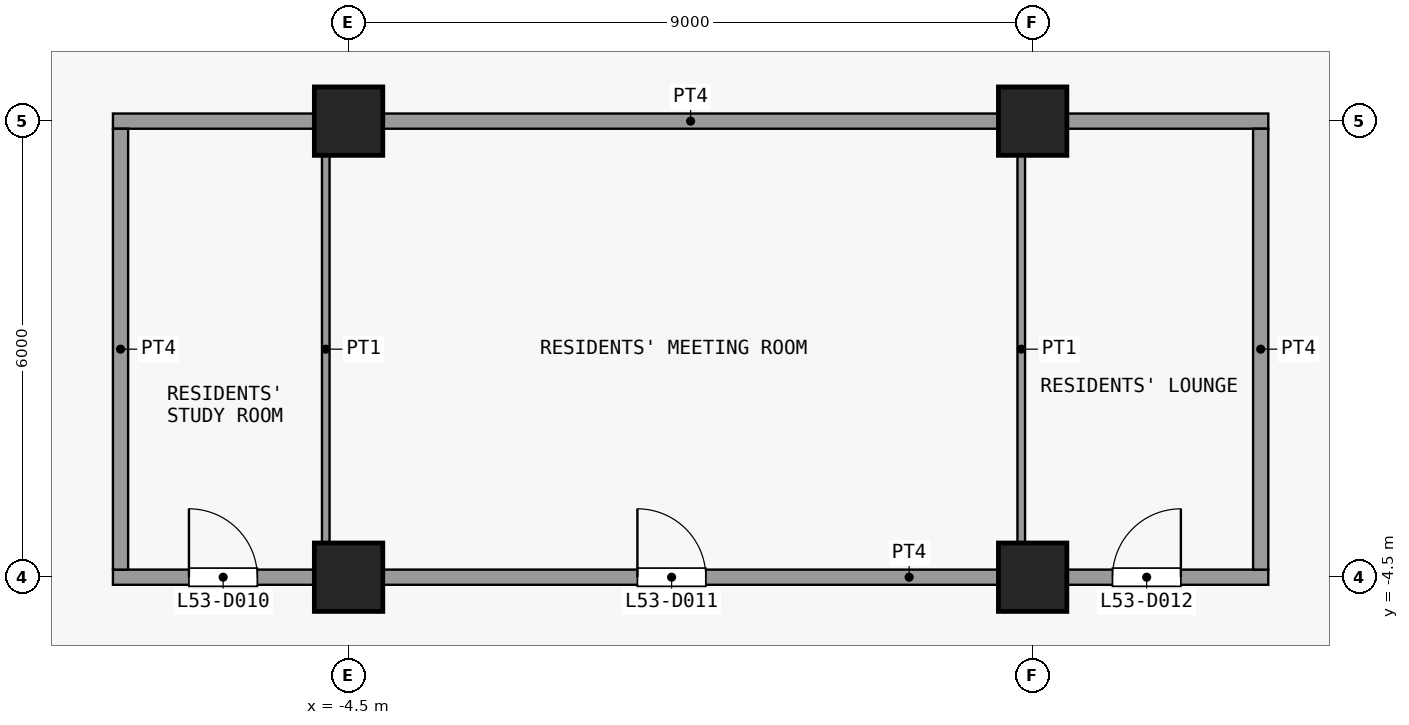
"""IFC4 building model, lengths in metres.
Left out: names, types, materials, properties, quantities, classifications, styles, units other than length and angle.
Written with IfcOpenShell. Run it as: python <this file> out.ifc"""

import sys

from ifc_helpers import new_model, si_unit, direction, frame, frame_2d, origin, origin_2d, place, context, subcontext, project, spatial, rectangle, extrude, element, fill, save


model = new_model("IFC4")
c1 = context("Model", 3, precision=1e-05, world=origin(), true_north=direction((0.0, 1.0)))
c2 = subcontext(c1, "Body", "Model", "MODEL_VIEW")
j1 = project(units=[si_unit("LENGTHUNIT", "METRE"), si_unit("PLANEANGLEUNIT", "RADIAN")], contexts=[c1])
p1 = place(None, origin())
s1 = spatial("IfcSite", under=j1, at=p1, CompositionType="ELEMENT")
p2 = place(p1, origin())
s2 = spatial("IfcBuilding", under=s1, at=p2, CompositionType="ELEMENT")
p3 = place(p2, frame((0.0, 0.0, 212.3)))
s3 = spatial("IfcBuildingStorey", under=s2, at=p3, CompositionType="ELEMENT", Elevation=212.3)
for number, where, z_axis, x_axis in (
    (1, (-4.5, -4.5, 0.0), (0.0, 0.0, 1.0), (1.0, 0.0, 0.0)),
    (2, (-4.5, 1.5, 0.0), (0.0, 0.0, 1.0), (1.0, 0.0, 0.0)),
    (3, (4.5, -4.5, 0.0), (0.0, 0.0, 1.0), (1.0, 0.0, 0.0)),
    (4, (4.5, 1.5, 0.0), (0.0, 0.0, 1.0), (1.0, 0.0, 0.0)),
):
    element("IfcColumn", number, at=place(p3, frame(where, z_axis=z_axis, x_axis=x_axis)), inside=s3, PredefinedType="COLUMN", context=c2, shape_type="SweptSolid", body=[
        extrude(rectangle(XDim=0.9, YDim=0.9, at=origin_2d()), origin(), (0.0, 0.0, 1.0), 3.6),
    ])
p4 = place(p3, frame((-7.6, -4.5, 0.0), z_axis=(0.0, 0.0, 1.0), x_axis=(1.0, 0.0, 0.0)))
e5 = element("IfcWall", 5, at=p4, inside=s3, PredefinedType="PARTITIONING", context=c2, shape_type="SweptSolid", body=[
    extrude(rectangle(XDim=15.2, YDim=0.2, at=frame_2d((7.6, 0.0))), origin(), (0.0, 0.0, 1.0), 3.3),
])
p5 = place(p4, frame((1.0, 0.0, 0.0)))
e6 = element("IfcOpeningElement", 6, at=p5, cuts=e5, PredefinedType="OPENING", context=c2, shape_type="SweptSolid", body=[
    extrude(rectangle(XDim=0.9, YDim=2.1, at=frame_2d((0.45, 1.05))), frame((0.0, 0.11, 0.0), z_axis=(0.0, -1.0, 0.0), x_axis=(1.0, 0.0, 0.0)), (0.0, 0.0, 1.0), 0.22),
])
p6 = place(p4, frame((6.9, 0.0, 0.0)))
e7 = element("IfcOpeningElement", 7, at=p6, cuts=e5, PredefinedType="OPENING", context=c2, shape_type="SweptSolid", body=[
    extrude(rectangle(XDim=0.9, YDim=2.1, at=frame_2d((0.45, 1.05))), frame((0.0, 0.11, 0.0), z_axis=(0.0, -1.0, 0.0), x_axis=(1.0, 0.0, 0.0)), (0.0, 0.0, 1.0), 0.22),
])
p7 = place(p4, frame((13.15, 0.0, 0.0)))
e8 = element("IfcOpeningElement", 8, at=p7, cuts=e5, PredefinedType="OPENING", context=c2, shape_type="SweptSolid", body=[
    extrude(rectangle(XDim=0.9, YDim=2.1, at=frame_2d((0.45, 1.05))), frame((0.0, 0.11, 0.0), z_axis=(0.0, -1.0, 0.0), x_axis=(1.0, 0.0, 0.0)), (0.0, 0.0, 1.0), 0.22),
])
p8 = place(p3, frame((-7.6, 1.5, 0.0), z_axis=(0.0, 0.0, 1.0), x_axis=(1.0, 0.0, 0.0)))
e9 = element("IfcWall", 9, at=p8, inside=s3, PredefinedType="PARTITIONING", context=c2, shape_type="SweptSolid", body=[
    extrude(rectangle(XDim=15.2, YDim=0.2, at=frame_2d((7.6, 0.0))), origin(), (0.0, 0.0, 1.0), 3.3),
])
p9 = place(p3, frame((-7.5, -4.4, 0.0), z_axis=(0.0, 0.0, 1.0), x_axis=(0.0, 1.0, 0.0)))
e10 = element("IfcWall", 10, at=p9, inside=s3, PredefinedType="PARTITIONING", context=c2, shape_type="SweptSolid", body=[
    extrude(rectangle(XDim=5.8, YDim=0.2, at=frame_2d((2.9, 0.0))), origin(), (0.0, 0.0, 1.0), 3.3),
])
for number, where, z_axis, x_axis in (
    (11, (-4.8, -4.4, 0.0), (0.0, 0.0, 1.0), (0.0, 1.0, 0.0)),
    (12, (4.35, -4.4, 0.0), (0.0, 0.0, 1.0), (0.0, 1.0, 0.0)),
):
    element("IfcWall", number, at=place(p3, frame(where, z_axis=z_axis, x_axis=x_axis)), inside=s3, PredefinedType="PARTITIONING", context=c2, shape_type="SweptSolid", body=[
        extrude(rectangle(XDim=5.8, YDim=0.1, at=frame_2d((2.9, 0.0))), origin(), (0.0, 0.0, 1.0), 3.3),
    ])
p10 = place(p3, frame((7.5, -4.4, 0.0), z_axis=(0.0, 0.0, 1.0), x_axis=(0.0, 1.0, 0.0)))
e13 = element("IfcWall", 13, at=p10, inside=s3, PredefinedType="PARTITIONING", context=c2, shape_type="SweptSolid", body=[
    extrude(rectangle(XDim=5.8, YDim=0.2, at=frame_2d((2.9, 0.0))), origin(), (0.0, 0.0, 1.0), 3.3),
])
p11 = place(p5, origin())
e14 = element("IfcDoor", 14, at=p11, inside=s3, OperationType="SINGLE_SWING_RIGHT", PredefinedType="DOOR", context=c2, shape_type="SweptSolid", body=[
    extrude(rectangle(XDim=0.9, YDim=2.1, at=frame_2d((0.45, 1.05))), frame((0.0, 0.025, 0.0), z_axis=(0.0, -1.0, 0.0), x_axis=(1.0, 0.0, 0.0)), (0.0, 0.0, 1.0), 0.05),
])
fill(e6, e14)
p12 = place(p6, origin())
e15 = element("IfcDoor", 15, at=p12, inside=s3, OperationType="SINGLE_SWING_RIGHT", PredefinedType="DOOR", context=c2, shape_type="SweptSolid", body=[
    extrude(rectangle(XDim=0.9, YDim=2.1, at=frame_2d((0.45, 1.05))), frame((0.0, 0.025, 0.0), z_axis=(0.0, -1.0, 0.0), x_axis=(1.0, 0.0, 0.0)), (0.0, 0.0, 1.0), 0.05),
])
fill(e7, e15)
p13 = place(p7, origin())
e16 = element("IfcDoor", 16, at=p13, inside=s3, OperationType="SINGLE_SWING_LEFT", PredefinedType="DOOR", context=c2, shape_type="SweptSolid", body=[
    extrude(rectangle(XDim=0.9, YDim=2.1, at=frame_2d((0.45, 1.05))), frame((0.0, 0.025, 0.0), z_axis=(0.0, -1.0, 0.0), x_axis=(1.0, 0.0, 0.0)), (0.0, 0.0, 1.0), 0.05),
])
fill(e8, e16)
save(model, sys.argv[1])
